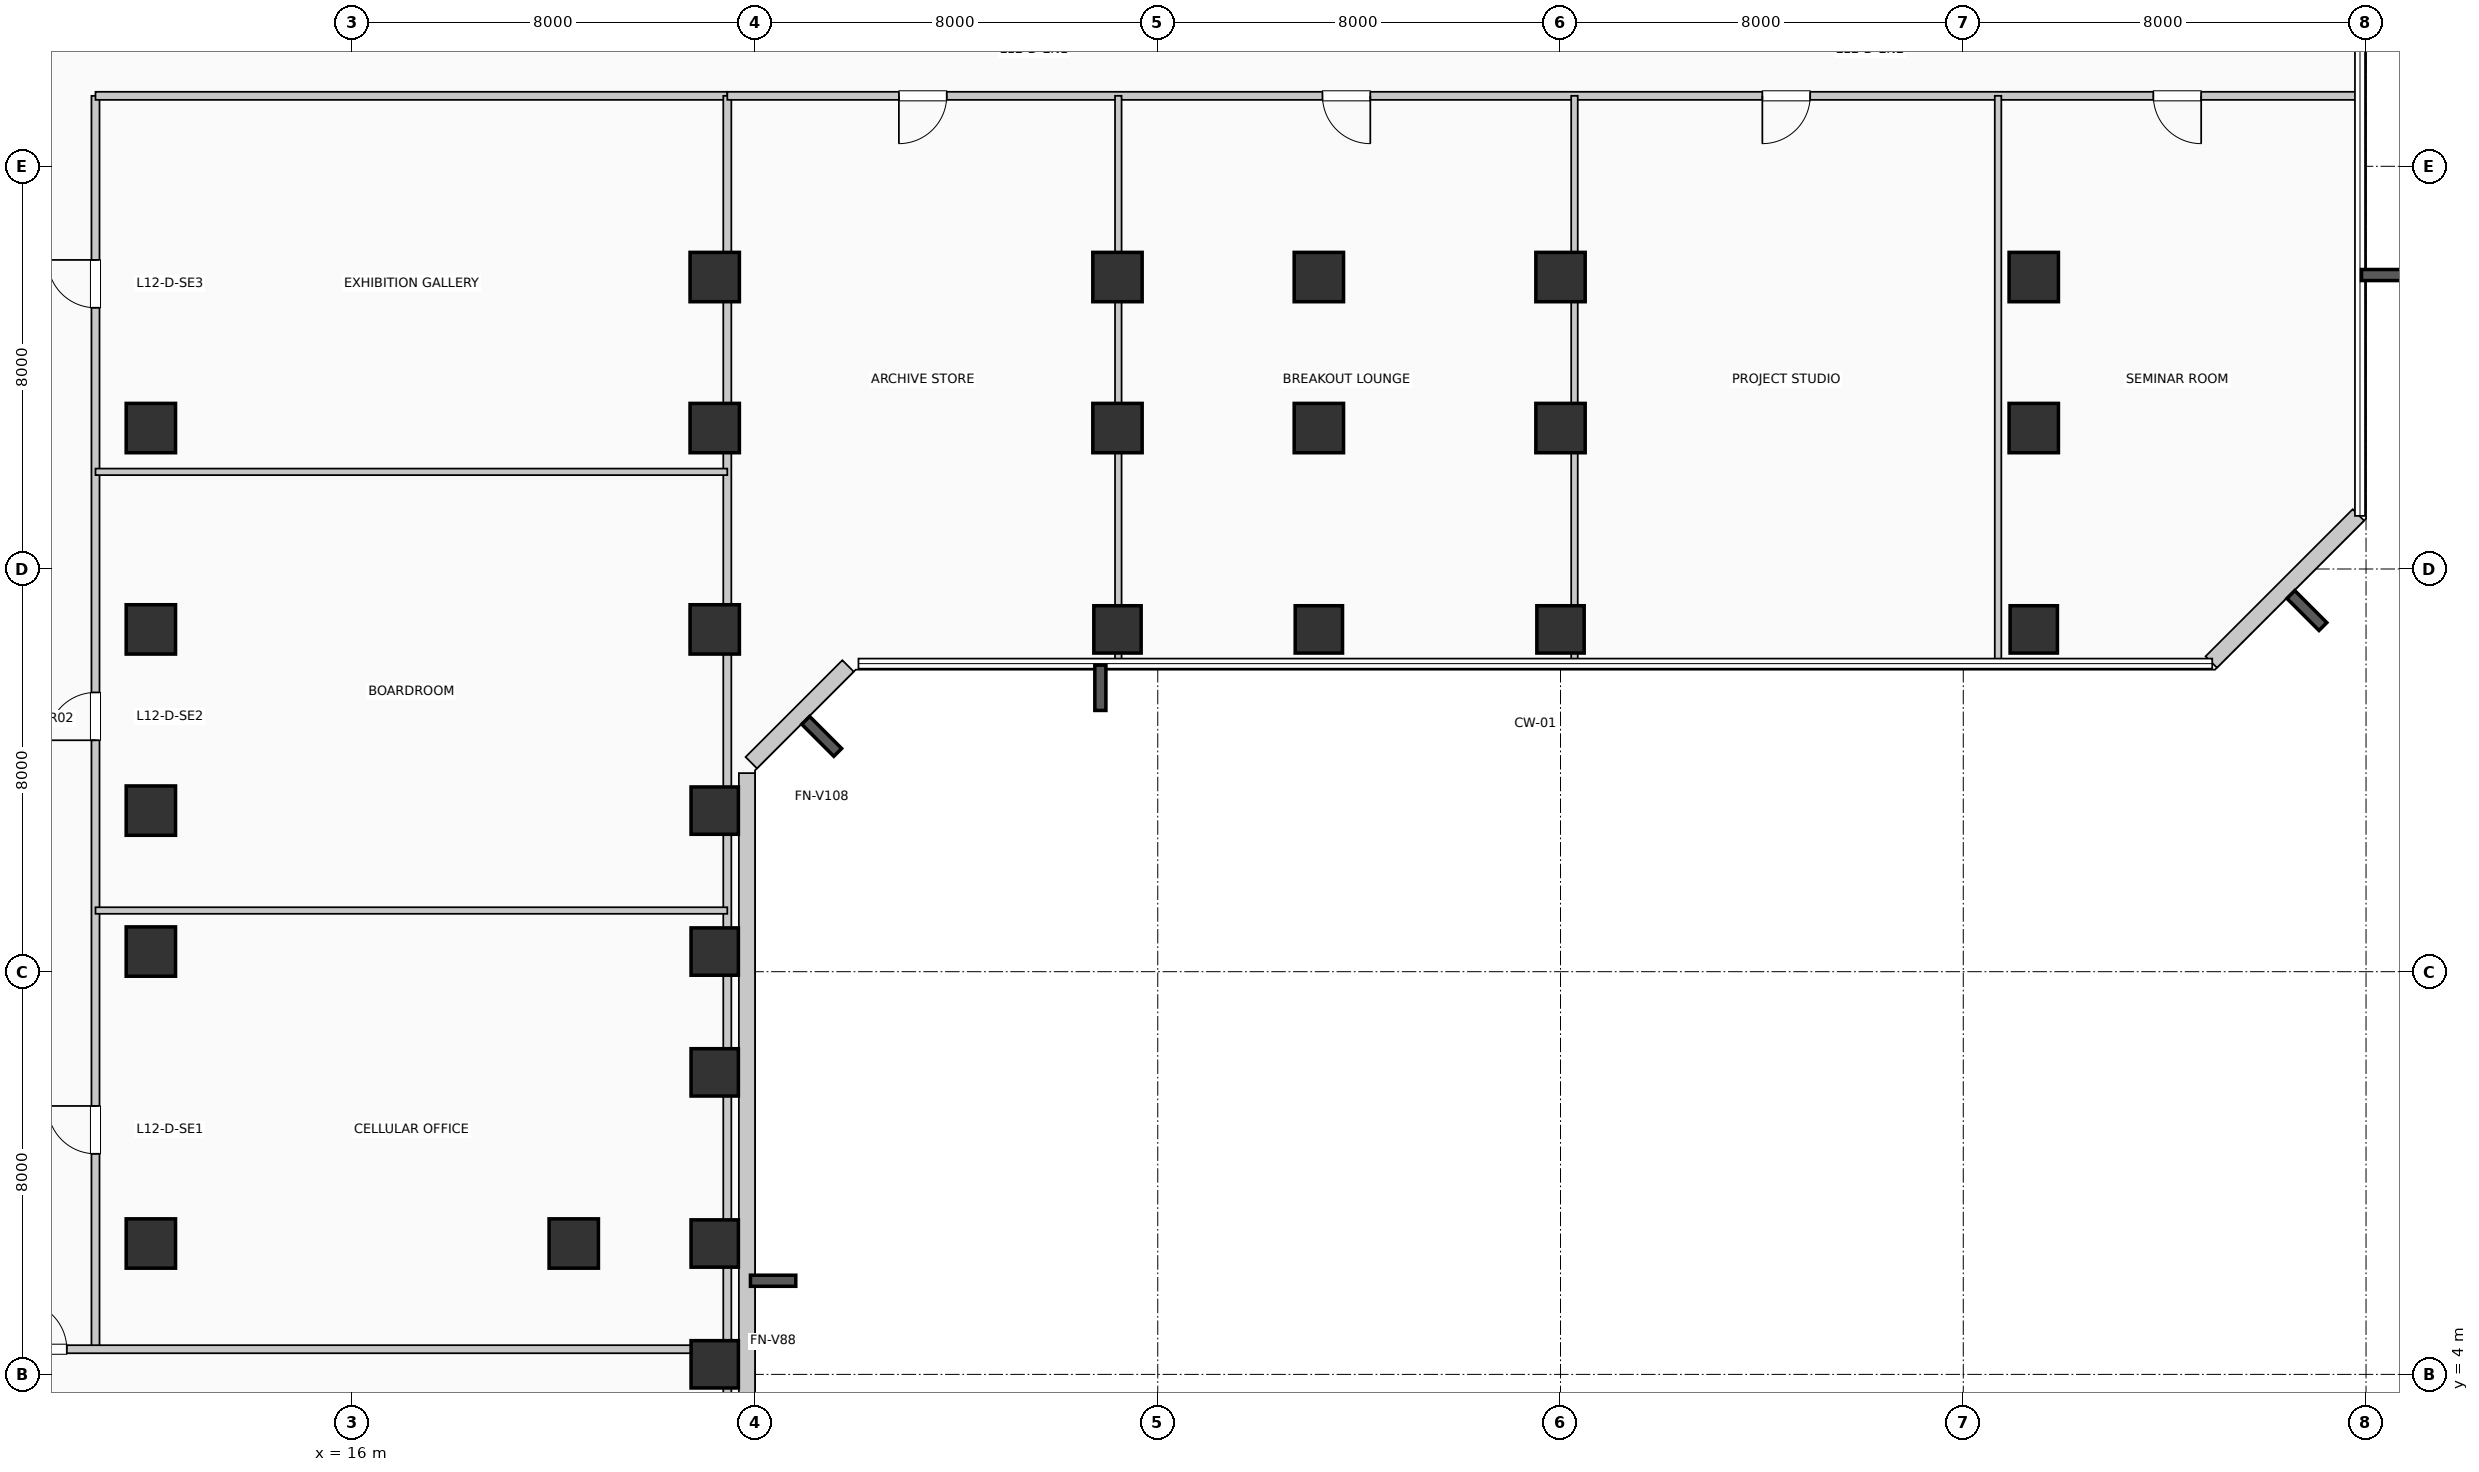
"""IFC4 building model, lengths in metres.
Left out: names, types, materials, properties, quantities, classifications, styles, units other than length and angle.
Written with IfcOpenShell. Run it as: python <this file> out.ifc"""

import sys

from ifc_helpers import new_model, si_unit, direction, frame, frame_2d, origin, origin_2d, place, context, subcontext, project, spatial, rectangle, extrude, element, fill, save


model = new_model("IFC4")
c1 = context("Model", 3, precision=1e-05, world=origin(), true_north=direction((0.0, 1.0)))
c2 = subcontext(c1, "Body", "Model", "MODEL_VIEW")
j1 = project(units=[si_unit("LENGTHUNIT", "METRE"), si_unit("PLANEANGLEUNIT", "RADIAN")], contexts=[c1])
p1 = place(None, origin())
s1 = spatial("IfcSite", under=j1, at=p1, CompositionType="ELEMENT")
p2 = place(p1, origin())
s2 = spatial("IfcBuilding", under=s1, at=p2, CompositionType="ELEMENT")
p3 = place(p2, frame((0.0, 0.0, 54.12)))
s3 = spatial("IfcBuildingStorey", under=s2, at=p3, CompositionType="ELEMENT", Elevation=54.12)
for number, where, z_axis, x_axis in (
    (1, (12.0, 6.6, 0.0), (0.0, 0.0, 1.0), (1.0, 0.0, 0.0)),
    (2, (12.0, 12.4, 0.0), (0.0, 0.0, 1.0), (1.0, 0.0, 0.0)),
    (3, (12.0, 15.2, 0.0), (0.0, 0.0, 1.0), (1.0, 0.0, 0.0)),
    (4, (12.0, 18.8, 0.0), (0.0, 0.0, 1.0), (1.0, 0.0, 0.0)),
    (5, (12.0, 22.8, 0.0), (0.0, 0.0, 1.0), (1.0, 0.0, 0.0)),
    (6, (20.4, 6.6, 0.0), (0.0, 0.0, 1.0), (1.0, 0.0, 0.0)),
):
    element("IfcColumn", number, at=place(p3, frame(where, z_axis=z_axis, x_axis=x_axis)), inside=s3, PredefinedType="COLUMN", context=c2, shape_type="SweptSolid", body=[
        extrude(rectangle(XDim=0.98, YDim=0.98, at=origin_2d()), origin(), (0.0, 0.0, 1.0), 3.96),
    ])
for number, where, z_axis, x_axis in (
    (7, (23.2, 4.2, 0.0), (0.0, 0.0, 1.0), (1.0, 0.0, 0.0)),
    (8, (23.2, 6.6, 0.0), (0.0, 0.0, 1.0), (1.0, 0.0, 0.0)),
    (9, (23.2, 10.0, 0.0), (0.0, 0.0, 1.0), (1.0, 0.0, 0.0)),
    (10, (23.2, 12.4, 0.0), (0.0, 0.0, 1.0), (1.0, 0.0, 0.0)),
    (11, (23.2, 15.2, 0.0), (0.0, 0.0, 1.0), (1.0, 0.0, 0.0)),
):
    element("IfcColumn", number, at=place(p3, frame(where, z_axis=z_axis, x_axis=x_axis)), inside=s3, PredefinedType="COLUMN", context=c2, shape_type="SweptSolid", body=[
        extrude(rectangle(XDim=0.94, YDim=0.94, at=origin_2d()), origin(), (0.0, 0.0, 1.0), 3.96),
    ])
for number, where, z_axis, x_axis in (
    (12, (23.2, 18.8, 0.0), (0.0, 0.0, 1.0), (1.0, 0.0, 0.0)),
    (13, (23.2, 22.8, 0.0), (0.0, 0.0, 1.0), (1.0, 0.0, 0.0)),
    (14, (23.2, 25.8, 0.0), (0.0, 0.0, 1.0), (1.0, 0.0, 0.0)),
):
    element("IfcColumn", number, at=place(p3, frame(where, z_axis=z_axis, x_axis=x_axis)), inside=s3, PredefinedType="COLUMN", context=c2, shape_type="SweptSolid", body=[
        extrude(rectangle(XDim=0.98, YDim=0.98, at=origin_2d()), origin(), (0.0, 0.0, 1.0), 3.96),
    ])
p4 = place(p3, frame((31.2, 18.8, 0.0), z_axis=(0.0, 0.0, 1.0), x_axis=(1.0, 0.0, 0.0)))
e15 = element("IfcColumn", 15, at=p4, inside=s3, PredefinedType="COLUMN", context=c2, shape_type="SweptSolid", body=[
    extrude(rectangle(XDim=0.94, YDim=0.94, at=origin_2d()), origin(), (0.0, 0.0, 1.0), 3.96),
])
for number, where, z_axis, x_axis in (
    (16, (31.2, 22.8, 0.0), (0.0, 0.0, 1.0), (1.0, 0.0, 0.0)),
    (17, (31.2, 25.8, 0.0), (0.0, 0.0, 1.0), (1.0, 0.0, 0.0)),
):
    element("IfcColumn", number, at=place(p3, frame(where, z_axis=z_axis, x_axis=x_axis)), inside=s3, PredefinedType="COLUMN", context=c2, shape_type="SweptSolid", body=[
        extrude(rectangle(XDim=0.98, YDim=0.98, at=origin_2d()), origin(), (0.0, 0.0, 1.0), 3.96),
    ])
p5 = place(p3, frame((35.2, 18.8, 0.0), z_axis=(0.0, 0.0, 1.0), x_axis=(1.0, 0.0, 0.0)))
e18 = element("IfcColumn", 18, at=p5, inside=s3, PredefinedType="COLUMN", context=c2, shape_type="SweptSolid", body=[
    extrude(rectangle(XDim=0.94, YDim=0.94, at=origin_2d()), origin(), (0.0, 0.0, 1.0), 3.96),
])
for number, where, z_axis, x_axis in (
    (19, (35.2, 22.8, 0.0), (0.0, 0.0, 1.0), (1.0, 0.0, 0.0)),
    (20, (35.2, 25.8, 0.0), (0.0, 0.0, 1.0), (1.0, 0.0, 0.0)),
):
    element("IfcColumn", number, at=place(p3, frame(where, z_axis=z_axis, x_axis=x_axis)), inside=s3, PredefinedType="COLUMN", context=c2, shape_type="SweptSolid", body=[
        extrude(rectangle(XDim=0.98, YDim=0.98, at=origin_2d()), origin(), (0.0, 0.0, 1.0), 3.96),
    ])
p6 = place(p3, frame((40.0, 18.8, 0.0), z_axis=(0.0, 0.0, 1.0), x_axis=(1.0, 0.0, 0.0)))
e21 = element("IfcColumn", 21, at=p6, inside=s3, PredefinedType="COLUMN", context=c2, shape_type="SweptSolid", body=[
    extrude(rectangle(XDim=0.94, YDim=0.94, at=origin_2d()), origin(), (0.0, 0.0, 1.0), 3.96),
])
for number, where, z_axis, x_axis in (
    (22, (40.0, 22.8, 0.0), (0.0, 0.0, 1.0), (1.0, 0.0, 0.0)),
    (23, (40.0, 25.8, 0.0), (0.0, 0.0, 1.0), (1.0, 0.0, 0.0)),
):
    element("IfcColumn", number, at=place(p3, frame(where, z_axis=z_axis, x_axis=x_axis)), inside=s3, PredefinedType="COLUMN", context=c2, shape_type="SweptSolid", body=[
        extrude(rectangle(XDim=0.98, YDim=0.98, at=origin_2d()), origin(), (0.0, 0.0, 1.0), 3.96),
    ])
p7 = place(p3, frame((49.4, 18.8, 0.0), z_axis=(0.0, 0.0, 1.0), x_axis=(1.0, 0.0, 0.0)))
e24 = element("IfcColumn", 24, at=p7, inside=s3, PredefinedType="COLUMN", context=c2, shape_type="SweptSolid", body=[
    extrude(rectangle(XDim=0.94, YDim=0.94, at=origin_2d()), origin(), (0.0, 0.0, 1.0), 3.96),
])
for number, where, z_axis, x_axis in (
    (25, (49.4, 22.8, 0.0), (0.0, 0.0, 1.0), (1.0, 0.0, 0.0)),
    (26, (49.4, 25.8, 0.0), (0.0, 0.0, 1.0), (1.0, 0.0, 0.0)),
):
    element("IfcColumn", number, at=place(p3, frame(where, z_axis=z_axis, x_axis=x_axis)), inside=s3, PredefinedType="COLUMN", context=c2, shape_type="SweptSolid", body=[
        extrude(rectangle(XDim=0.98, YDim=0.98, at=origin_2d()), origin(), (0.0, 0.0, 1.0), 3.96),
    ])
p8 = place(p3, frame((23.84, 3.055, 0.0), z_axis=(0.0, 0.0, 1.0), x_axis=(0.0, 1.0, 0.0)))
e27 = element("IfcWall", 27, at=p8, inside=s3, PredefinedType="SOLIDWALL", context=c2, shape_type="SweptSolid", body=[
    extrude(rectangle(XDim=12.89, YDim=0.32, at=frame_2d((6.445, 0.0))), origin(), (0.0, 0.0, 1.0), 3.71),
])
p9 = place(p3, frame((23.926, 16.152, 0.0), z_axis=(0.0, 0.0, 1.0), x_axis=(0.707106781187, 0.707106781187, 0.0)))
e28 = element("IfcWall", 28, at=p9, inside=s3, PredefinedType="SOLIDWALL", context=c2, shape_type="SweptSolid", body=[
    extrude(rectangle(XDim=2.718, YDim=0.32, at=frame_2d((1.359, 0.0))), origin(), (0.0, 0.0, 1.0), 3.71),
])
p10 = place(p3, frame((52.926, 18.152, 0.0), z_axis=(0.0, 0.0, 1.0), x_axis=(0.707106781187, 0.707106781187, 0.0)))
e29 = element("IfcWall", 29, at=p10, inside=s3, PredefinedType="SOLIDWALL", context=c2, shape_type="SweptSolid", body=[
    extrude(rectangle(XDim=4.133, YDim=0.32, at=frame_2d((2.066, 0.0))), origin(), (0.0, 0.0, 1.0), 3.71),
])
p11 = place(p3, frame((10.9, 4.5, 0.0), z_axis=(0.0, 0.0, 1.0), x_axis=(0.0, 1.0, 0.0)))
e30 = element("IfcWall", 30, at=p11, inside=s3, PredefinedType="PARTITIONING", context=c2, shape_type="SweptSolid", body=[
    extrude(rectangle(XDim=24.9, YDim=0.16, at=frame_2d((12.45, 0.0))), origin(), (0.0, 0.0, 1.0), 3.71),
])
p12 = place(p11, frame((3.883, 0.0, 0.0)))
e31 = element("IfcOpeningElement", 31, at=p12, cuts=e30, PredefinedType="OPENING", context=c2, shape_type="SweptSolid", body=[
    extrude(rectangle(XDim=0.95, YDim=2.15, at=frame_2d((0.475, 1.075))), frame((0.0, 0.09, 0.0), z_axis=(0.0, -1.0, 0.0), x_axis=(1.0, 0.0, 0.0)), (0.0, 0.0, 1.0), 0.18),
])
p13 = place(p11, frame((12.097, 0.0, 0.0)))
e32 = element("IfcOpeningElement", 32, at=p13, cuts=e30, PredefinedType="OPENING", context=c2, shape_type="SweptSolid", body=[
    extrude(rectangle(XDim=0.95, YDim=2.15, at=frame_2d((0.475, 1.075))), frame((0.0, 0.09, 0.0), z_axis=(0.0, -1.0, 0.0), x_axis=(1.0, 0.0, 0.0)), (0.0, 0.0, 1.0), 0.18),
])
p14 = place(p11, frame((20.69, 0.0, 0.0)))
e33 = element("IfcOpeningElement", 33, at=p14, cuts=e30, PredefinedType="OPENING", context=c2, shape_type="SweptSolid", body=[
    extrude(rectangle(XDim=0.95, YDim=2.15, at=frame_2d((0.475, 1.075))), frame((0.0, 0.09, 0.0), z_axis=(0.0, -1.0, 0.0), x_axis=(1.0, 0.0, 0.0)), (0.0, 0.0, 1.0), 0.18),
])
p15 = place(p3, frame((0.19, 4.5, 0.0), z_axis=(0.0, 0.0, 1.0), x_axis=(1.0, 0.0, 0.0)))
e34 = element("IfcWall", 34, at=p15, inside=s3, PredefinedType="PARTITIONING", context=c2, shape_type="SweptSolid", body=[
    extrude(rectangle(XDim=23.26, YDim=0.16, at=frame_2d((11.63, 0.0))), origin(), (0.0, 0.0, 1.0), 2.995),
])
p16 = place(p15, frame((9.19, 0.0, 0.0)))
e35 = element("IfcOpeningElement", 35, at=p16, cuts=e34, PredefinedType="OPENING", context=c2, shape_type="SweptSolid", body=[
    extrude(rectangle(XDim=0.95, YDim=2.15, at=frame_2d((0.475, 1.075))), frame((0.0, 0.09, 0.0), z_axis=(0.0, -1.0, 0.0), x_axis=(1.0, 0.0, 0.0)), (0.0, 0.0, 1.0), 0.18),
])
p17 = place(p3, frame((10.9, 29.4, 0.0), z_axis=(0.0, 0.0, 1.0), x_axis=(1.0, 0.0, 0.0)))
e36 = element("IfcWall", 36, at=p17, inside=s3, PredefinedType="PARTITIONING", context=c2, shape_type="SweptSolid", body=[
    extrude(rectangle(XDim=12.55, YDim=0.16, at=frame_2d((6.275, 0.0))), origin(), (0.0, 0.0, 1.0), 3.365),
])
p18 = place(p3, frame((23.45, 0.19, 0.0), z_axis=(0.0, 0.0, 1.0), x_axis=(0.0, 1.0, 0.0)))
e37 = element("IfcWall", 37, at=p18, inside=s3, PredefinedType="PARTITIONING", context=c2, shape_type="SweptSolid", body=[
    extrude(rectangle(XDim=29.21, YDim=0.16, at=frame_2d((14.605, 0.0))), origin(), (0.0, 0.0, 1.0), 2.995),
])
for number, where, z_axis, x_axis in (
    (38, (10.9, 13.215, 0.0), (0.0, 0.0, 1.0), (1.0, 0.0, 0.0)),
    (39, (10.9, 21.93, 0.0), (0.0, 0.0, 1.0), (1.0, 0.0, 0.0)),
):
    element("IfcWall", number, at=place(p3, frame(where, z_axis=z_axis, x_axis=x_axis)), inside=s3, PredefinedType="PARTITIONING", context=c2, shape_type="SweptSolid", body=[
        extrude(rectangle(XDim=12.55, YDim=0.13, at=frame_2d((6.275, 0.0))), origin(), (0.0, 0.0, 1.0), 3.71),
    ])
p19 = place(p3, frame((23.45, 29.4, 0.0), z_axis=(0.0, 0.0, 1.0), x_axis=(1.0, 0.0, 0.0)))
e40 = element("IfcWall", 40, at=p19, inside=s3, PredefinedType="PARTITIONING", context=c2, shape_type="SweptSolid", body=[
    extrude(rectangle(XDim=32.36, YDim=0.16, at=frame_2d((16.18, 0.0))), origin(), (0.0, 0.0, 1.0), 3.365),
])
p20 = place(p19, frame((4.358, 0.0, 0.0), z_axis=(0.0, 0.0, 1.0), x_axis=(-1.0, 0.0, 0.0)))
e41 = element("IfcOpeningElement", 41, at=p20, cuts=e40, PredefinedType="OPENING", context=c2, shape_type="SweptSolid", body=[
    extrude(rectangle(XDim=0.95, YDim=2.15, at=frame_2d((0.475, 1.075))), frame((0.0, 0.09, 0.0), z_axis=(0.0, -1.0, 0.0), x_axis=(1.0, 0.0, 0.0)), (0.0, 0.0, 1.0), 0.18),
])
p21 = place(p19, frame((12.772, 0.0, 0.0), z_axis=(0.0, 0.0, 1.0), x_axis=(-1.0, 0.0, 0.0)))
e42 = element("IfcOpeningElement", 42, at=p21, cuts=e40, PredefinedType="OPENING", context=c2, shape_type="SweptSolid", body=[
    extrude(rectangle(XDim=0.95, YDim=2.15, at=frame_2d((0.475, 1.075))), frame((0.0, 0.09, 0.0), z_axis=(0.0, -1.0, 0.0), x_axis=(1.0, 0.0, 0.0)), (0.0, 0.0, 1.0), 0.18),
])
p22 = place(p19, frame((21.509, 0.0, 0.0), z_axis=(0.0, 0.0, 1.0), x_axis=(-1.0, 0.0, 0.0)))
e43 = element("IfcOpeningElement", 43, at=p22, cuts=e40, PredefinedType="OPENING", context=c2, shape_type="SweptSolid", body=[
    extrude(rectangle(XDim=0.95, YDim=2.15, at=frame_2d((0.475, 1.075))), frame((0.0, 0.09, 0.0), z_axis=(0.0, -1.0, 0.0), x_axis=(1.0, 0.0, 0.0)), (0.0, 0.0, 1.0), 0.18),
])
p23 = place(p19, frame((29.275, 0.0, 0.0), z_axis=(0.0, 0.0, 1.0), x_axis=(-1.0, 0.0, 0.0)))
e44 = element("IfcOpeningElement", 44, at=p23, cuts=e40, PredefinedType="OPENING", context=c2, shape_type="SweptSolid", body=[
    extrude(rectangle(XDim=0.95, YDim=2.15, at=frame_2d((0.475, 1.075))), frame((0.0, 0.09, 0.0), z_axis=(0.0, -1.0, 0.0), x_axis=(1.0, 0.0, 0.0)), (0.0, 0.0, 1.0), 0.18),
])
for number, where, z_axis, x_axis in (
    (45, (31.216, 18.19, 0.0), (0.0, 0.0, 1.0), (0.0, 1.0, 0.0)),
    (46, (40.277, 18.19, 0.0), (0.0, 0.0, 1.0), (0.0, 1.0, 0.0)),
):
    element("IfcWall", number, at=place(p3, frame(where, z_axis=z_axis, x_axis=x_axis)), inside=s3, PredefinedType="PARTITIONING", context=c2, shape_type="SweptSolid", body=[
        extrude(rectangle(XDim=11.21, YDim=0.13, at=frame_2d((5.605, 0.0))), origin(), (0.0, 0.0, 1.0), 2.995),
    ])
p24 = place(p3, frame((48.691, 18.19, 0.0), z_axis=(0.0, 0.0, 1.0), x_axis=(0.0, 1.0, 0.0)))
e47 = element("IfcWall", 47, at=p24, inside=s3, PredefinedType="PARTITIONING", context=c2, shape_type="SweptSolid", body=[
    extrude(rectangle(XDim=11.21, YDim=0.13, at=frame_2d((5.605, 0.0))), origin(), (0.0, 0.0, 1.0), 3.71),
])
p25 = place(p16, origin())
e48 = element("IfcDoor", 48, at=p25, inside=s3, OperationType="SINGLE_SWING_LEFT", PredefinedType="DOOR", context=c2, shape_type="SweptSolid", body=[
    extrude(rectangle(XDim=0.95, YDim=2.15, at=frame_2d((0.475, 1.075))), frame((0.0, 0.025, 0.0), z_axis=(0.0, -1.0, 0.0), x_axis=(1.0, 0.0, 0.0)), (0.0, 0.0, 1.0), 0.05),
])
fill(e35, e48)
p26 = place(p12, origin())
e49 = element("IfcDoor", 49, at=p26, inside=s3, OperationType="SINGLE_SWING_RIGHT", PredefinedType="DOOR", context=c2, shape_type="SweptSolid", body=[
    extrude(rectangle(XDim=0.95, YDim=2.15, at=frame_2d((0.475, 1.075))), frame((0.0, 0.025, 0.0), z_axis=(0.0, -1.0, 0.0), x_axis=(1.0, 0.0, 0.0)), (0.0, 0.0, 1.0), 0.05),
])
fill(e31, e49)
p27 = place(p13, origin())
e50 = element("IfcDoor", 50, at=p27, inside=s3, OperationType="SINGLE_SWING_LEFT", PredefinedType="DOOR", context=c2, shape_type="SweptSolid", body=[
    extrude(rectangle(XDim=0.95, YDim=2.15, at=frame_2d((0.475, 1.075))), frame((0.0, 0.025, 0.0), z_axis=(0.0, -1.0, 0.0), x_axis=(1.0, 0.0, 0.0)), (0.0, 0.0, 1.0), 0.05),
])
fill(e32, e50)
p28 = place(p14, origin())
e51 = element("IfcDoor", 51, at=p28, inside=s3, OperationType="SINGLE_SWING_RIGHT", PredefinedType="DOOR", context=c2, shape_type="SweptSolid", body=[
    extrude(rectangle(XDim=0.95, YDim=2.15, at=frame_2d((0.475, 1.075))), frame((0.0, 0.025, 0.0), z_axis=(0.0, -1.0, 0.0), x_axis=(1.0, 0.0, 0.0)), (0.0, 0.0, 1.0), 0.05),
])
fill(e33, e51)
p29 = place(p20, origin())
e52 = element("IfcDoor", 52, at=p29, inside=s3, OperationType="SINGLE_SWING_LEFT", PredefinedType="DOOR", context=c2, shape_type="SweptSolid", body=[
    extrude(rectangle(XDim=0.95, YDim=2.15, at=frame_2d((0.475, 1.075))), frame((0.0, 0.025, 0.0), z_axis=(0.0, -1.0, 0.0), x_axis=(1.0, 0.0, 0.0)), (0.0, 0.0, 1.0), 0.05),
])
fill(e41, e52)
p30 = place(p21, origin())
e53 = element("IfcDoor", 53, at=p30, inside=s3, OperationType="SINGLE_SWING_RIGHT", PredefinedType="DOOR", context=c2, shape_type="SweptSolid", body=[
    extrude(rectangle(XDim=0.95, YDim=2.15, at=frame_2d((0.475, 1.075))), frame((0.0, 0.025, 0.0), z_axis=(0.0, -1.0, 0.0), x_axis=(1.0, 0.0, 0.0)), (0.0, 0.0, 1.0), 0.05),
])
fill(e42, e53)
p31 = place(p22, origin())
e54 = element("IfcDoor", 54, at=p31, inside=s3, OperationType="SINGLE_SWING_LEFT", PredefinedType="DOOR", context=c2, shape_type="SweptSolid", body=[
    extrude(rectangle(XDim=0.95, YDim=2.15, at=frame_2d((0.475, 1.075))), frame((0.0, 0.025, 0.0), z_axis=(0.0, -1.0, 0.0), x_axis=(1.0, 0.0, 0.0)), (0.0, 0.0, 1.0), 0.05),
])
fill(e43, e54)
p32 = place(p23, origin())
e55 = element("IfcDoor", 55, at=p32, inside=s3, OperationType="SINGLE_SWING_RIGHT", PredefinedType="DOOR", context=c2, shape_type="SweptSolid", body=[
    extrude(rectangle(XDim=0.95, YDim=2.15, at=frame_2d((0.475, 1.075))), frame((0.0, 0.025, 0.0), z_axis=(0.0, -1.0, 0.0), x_axis=(1.0, 0.0, 0.0)), (0.0, 0.0, 1.0), 0.05),
])
fill(e44, e55)
save(model, sys.argv[1])
